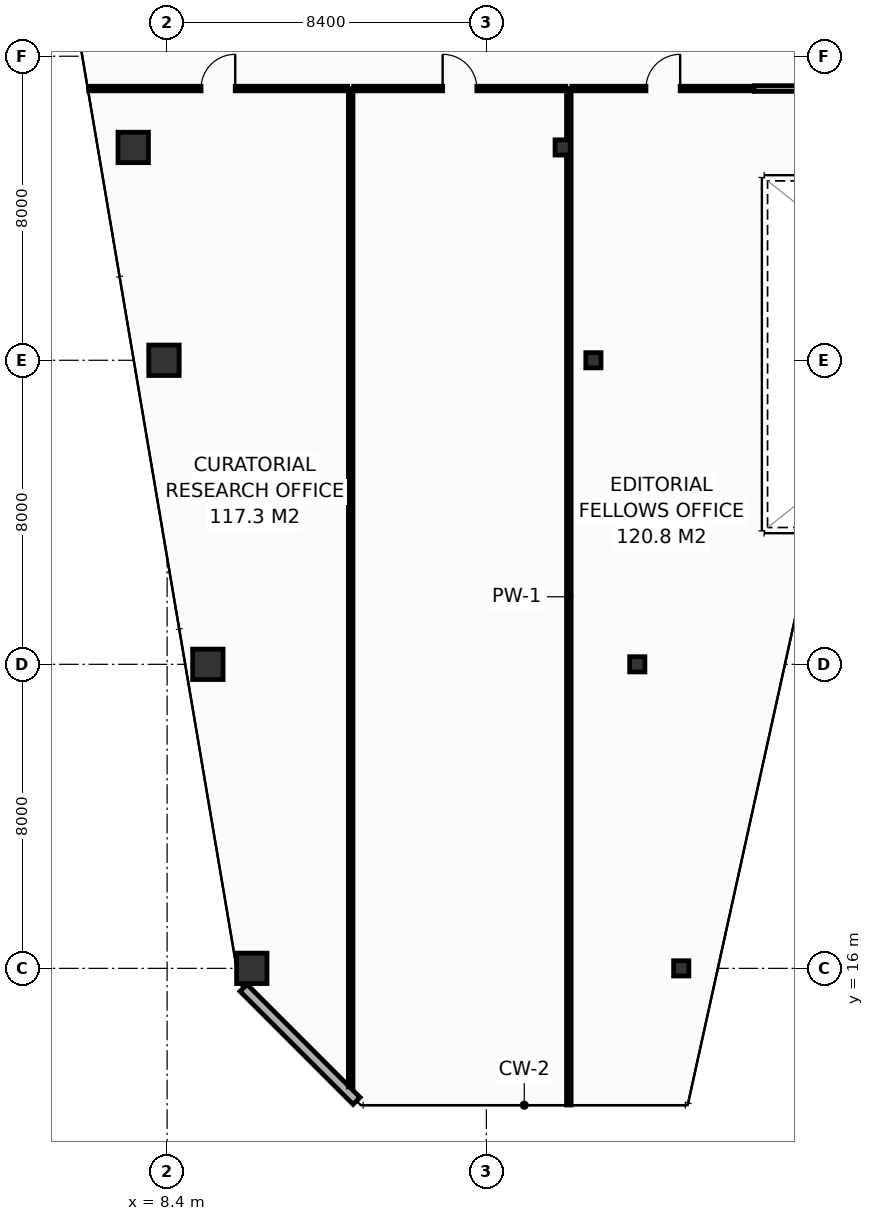
"""IFC4 building model, lengths in metres.
Left out: names, types, materials, properties, quantities, classifications, styles, units other than length and angle.
Written with IfcOpenShell. Run it as: python <this file> out.ifc"""

import sys

from ifc_helpers import new_model, si_unit, direction, frame, frame_2d, origin, origin_2d, place, context, subcontext, project, spatial, rectangle, hollow_rectangle, extrude, element, fill, save


model = new_model("IFC4")
c1 = context("Model", 3, precision=1e-05, world=origin(), true_north=direction((0.0, 1.0)))
c2 = subcontext(c1, "Body", "Model", "MODEL_VIEW")
j1 = project(units=[si_unit("LENGTHUNIT", "METRE"), si_unit("PLANEANGLEUNIT", "RADIAN")], contexts=[c1])
p1 = place(None, origin())
s1 = spatial("IfcSite", under=j1, at=p1, CompositionType="ELEMENT")
p2 = place(p1, origin())
s2 = spatial("IfcBuilding", under=s1, at=p2, CompositionType="ELEMENT")
p3 = place(p2, frame((0.0, 0.0, 186.6)))
s3 = spatial("IfcBuildingStorey", under=s2, at=p3, CompositionType="ELEMENT", Elevation=186.6)
p4 = place(p3, frame((10.628, 16.0, 0.0), z_axis=(0.0, 0.0, 1.0), x_axis=(1.0, 0.0, 0.0)))
e1 = element("IfcColumn", 1, at=p4, inside=s3, PredefinedType="COLUMN", context=c2, shape_type="SweptSolid", body=[
    extrude(hollow_rectangle(XDim=0.8, YDim=0.8, WallThickness=0.036, at=origin_2d()), origin(), (0.0, 0.0, 1.0), 3.8),
])
p5 = place(p3, frame((21.928, 16.0, 0.0), z_axis=(0.0, 0.0, 1.0), x_axis=(1.0, 0.0, 0.0)))
e2 = element("IfcColumn", 2, at=p5, inside=s3, PredefinedType="COLUMN", context=c2, shape_type="SweptSolid", body=[
    extrude(hollow_rectangle(XDim=0.4, YDim=0.4, WallThickness=0.016, at=origin_2d()), origin(), (0.0, 0.0, 1.0), 3.8),
])
p6 = place(p3, frame((9.472, 24.0, 0.0), z_axis=(0.0, 0.0, 1.0), x_axis=(1.0, 0.0, 0.0)))
e3 = element("IfcColumn", 3, at=p6, inside=s3, PredefinedType="COLUMN", context=c2, shape_type="SweptSolid", body=[
    extrude(hollow_rectangle(XDim=0.8, YDim=0.8, WallThickness=0.036, at=origin_2d()), origin(), (0.0, 0.0, 1.0), 3.8),
])
p7 = place(p3, frame((20.772, 24.0, 0.0), z_axis=(0.0, 0.0, 1.0), x_axis=(1.0, 0.0, 0.0)))
e4 = element("IfcColumn", 4, at=p7, inside=s3, PredefinedType="COLUMN", context=c2, shape_type="SweptSolid", body=[
    extrude(hollow_rectangle(XDim=0.4, YDim=0.4, WallThickness=0.016, at=origin_2d()), origin(), (0.0, 0.0, 1.0), 3.8),
])
p8 = place(p3, frame((8.317, 32.0, 0.0), z_axis=(0.0, 0.0, 1.0), x_axis=(1.0, 0.0, 0.0)))
e5 = element("IfcColumn", 5, at=p8, inside=s3, PredefinedType="COLUMN", context=c2, shape_type="SweptSolid", body=[
    extrude(hollow_rectangle(XDim=0.8, YDim=0.8, WallThickness=0.036, at=origin_2d()), origin(), (0.0, 0.0, 1.0), 3.8),
])
p9 = place(p3, frame((19.617, 32.0, 0.0), z_axis=(0.0, 0.0, 1.0), x_axis=(1.0, 0.0, 0.0)))
e6 = element("IfcColumn", 6, at=p9, inside=s3, PredefinedType="COLUMN", context=c2, shape_type="SweptSolid", body=[
    extrude(hollow_rectangle(XDim=0.4, YDim=0.4, WallThickness=0.016, at=origin_2d()), origin(), (0.0, 0.0, 1.0), 3.8),
])
p10 = place(p3, frame((7.508, 37.6, 0.0), z_axis=(0.0, 0.0, 1.0), x_axis=(1.0, 0.0, 0.0)))
e7 = element("IfcColumn", 7, at=p10, inside=s3, PredefinedType="COLUMN", context=c2, shape_type="SweptSolid", body=[
    extrude(hollow_rectangle(XDim=0.8, YDim=0.8, WallThickness=0.036, at=origin_2d()), origin(), (0.0, 0.0, 1.0), 3.8),
])
p11 = place(p3, frame((18.808, 37.6, 0.0), z_axis=(0.0, 0.0, 1.0), x_axis=(1.0, 0.0, 0.0)))
e8 = element("IfcColumn", 8, at=p11, inside=s3, PredefinedType="COLUMN", context=c2, shape_type="SweptSolid", body=[
    extrude(hollow_rectangle(XDim=0.4, YDim=0.4, WallThickness=0.016, at=origin_2d()), origin(), (0.0, 0.0, 1.0), 3.8),
])
p12 = place(p3, frame((10.411, 15.487, 0.0), z_axis=(0.0, 0.0, 1.0), x_axis=(0.707135806771, -0.70707775441, 0.0)))
e9 = element("IfcWall", 9, at=p12, inside=s3, PredefinedType="STANDARD", context=c2, shape_type="SweptSolid", body=[
    extrude(rectangle(XDim=4.206, YDim=0.26, at=frame_2d((2.103, 0.0))), origin(), (0.0, 0.0, 1.0), 3.55),
])
p13 = place(p3, frame((13.23, 12.88, 0.0), z_axis=(0.0, 0.0, 1.0), x_axis=(0.0, 1.0, 0.0)))
e10 = element("IfcWall", 10, at=p13, inside=s3, PredefinedType="PARTITIONING", context=c2, shape_type="SweptSolid", body=[
    extrude(rectangle(XDim=26.27, YDim=0.12, at=frame_2d((13.135, 0.0))), origin(), (0.0, 0.0, 1.0), 2.835),
])
p14 = place(p3, frame((18.97, 12.405, 0.0), z_axis=(0.0, 0.0, 1.0), x_axis=(0.0, 1.0, 0.0)))
e11 = element("IfcWall", 11, at=p14, inside=s3, PredefinedType="PARTITIONING", context=c2, shape_type="SweptSolid", body=[
    extrude(rectangle(XDim=26.745, YDim=0.12, at=frame_2d((13.373, 0.0))), origin(), (0.0, 0.0, 1.0), 2.835),
])
p15 = place(p3, frame((6.334, 39.15, 0.0), z_axis=(0.0, 0.0, 1.0), x_axis=(1.0, 0.0, 0.0)))
e12 = element("IfcWall", 12, at=p15, inside=s3, PredefinedType="PARTITIONING", context=c2, shape_type="SweptSolid", body=[
    extrude(rectangle(XDim=6.816, YDim=0.12, at=frame_2d((3.408, 0.0))), origin(), (0.0, 0.0, 1.0), 3.035),
])
p16 = place(p15, frame((2.958, 0.0, 0.0)))
e13 = element("IfcOpeningElement", 13, at=p16, cuts=e12, PredefinedType="OPENING", context=c2, shape_type="SweptSolid", body=[
    extrude(rectangle(XDim=0.9, YDim=2.1, at=frame_2d((0.45, 1.05))), frame((0.0, 0.07, 0.0), z_axis=(0.0, -1.0, 0.0), x_axis=(1.0, 0.0, 0.0)), (0.0, 0.0, 1.0), 0.14),
])
p17 = place(p3, frame((13.31, 39.15, 0.0), z_axis=(0.0, 0.0, 1.0), x_axis=(1.0, 0.0, 0.0)))
e14 = element("IfcWall", 14, at=p17, inside=s3, PredefinedType="PARTITIONING", context=c2, shape_type="SweptSolid", body=[
    extrude(rectangle(XDim=5.58, YDim=0.12, at=frame_2d((2.79, 0.0))), origin(), (0.0, 0.0, 1.0), 3.55),
])
p18 = place(p17, frame((2.34, 0.0, 0.0)))
e15 = element("IfcOpeningElement", 15, at=p18, cuts=e14, PredefinedType="OPENING", context=c2, shape_type="SweptSolid", body=[
    extrude(rectangle(XDim=0.9, YDim=2.1, at=frame_2d((0.45, 1.05))), frame((0.0, 0.07, 0.0), z_axis=(0.0, -1.0, 0.0), x_axis=(1.0, 0.0, 0.0)), (0.0, 0.0, 1.0), 0.14),
])
p19 = place(p3, frame((19.05, 39.15, 0.0), z_axis=(0.0, 0.0, 1.0), x_axis=(1.0, 0.0, 0.0)))
e16 = element("IfcWall", 16, at=p19, inside=s3, PredefinedType="PARTITIONING", context=c2, shape_type="SweptSolid", body=[
    extrude(rectangle(XDim=4.8, YDim=0.12, at=frame_2d((2.4, 0.0))), origin(), (0.0, 0.0, 1.0), 2.835),
])
p20 = place(p19, frame((1.95, 0.0, 0.0)))
e17 = element("IfcOpeningElement", 17, at=p20, cuts=e16, PredefinedType="OPENING", context=c2, shape_type="SweptSolid", body=[
    extrude(rectangle(XDim=0.9, YDim=2.1, at=frame_2d((0.45, 1.05))), frame((0.0, 0.07, 0.0), z_axis=(0.0, -1.0, 0.0), x_axis=(1.0, 0.0, 0.0)), (0.0, 0.0, 1.0), 0.14),
])
p21 = place(p3, frame((23.85, 39.15, 0.0), z_axis=(0.0, 0.0, 1.0), x_axis=(1.0, 0.0, 0.0)))
e18 = element("IfcWall", 18, at=p21, inside=s3, PredefinedType="PARTITIONING", context=c2, shape_type="SweptSolid", body=[
    extrude(rectangle(XDim=12.3, YDim=0.15, at=frame_2d((6.15, 0.0))), origin(), (0.0, 0.0, 1.0), 3.55),
])
p22 = place(p16, origin())
e19 = element("IfcDoor", 19, at=p22, inside=s3, OperationType="SINGLE_SWING_RIGHT", PredefinedType="DOOR", context=c2, shape_type="SweptSolid", body=[
    extrude(rectangle(XDim=0.9, YDim=2.1, at=frame_2d((0.45, 1.05))), frame((0.0, 0.025, 0.0), z_axis=(0.0, -1.0, 0.0), x_axis=(1.0, 0.0, 0.0)), (0.0, 0.0, 1.0), 0.05),
])
fill(e13, e19)
p23 = place(p18, origin())
e20 = element("IfcDoor", 20, at=p23, inside=s3, OperationType="SINGLE_SWING_LEFT", PredefinedType="DOOR", context=c2, shape_type="SweptSolid", body=[
    extrude(rectangle(XDim=0.9, YDim=2.1, at=frame_2d((0.45, 1.05))), frame((0.0, 0.025, 0.0), z_axis=(0.0, -1.0, 0.0), x_axis=(1.0, 0.0, 0.0)), (0.0, 0.0, 1.0), 0.05),
])
fill(e15, e20)
p24 = place(p20, origin())
e21 = element("IfcDoor", 21, at=p24, inside=s3, OperationType="SINGLE_SWING_RIGHT", PredefinedType="DOOR", context=c2, shape_type="SweptSolid", body=[
    extrude(rectangle(XDim=0.9, YDim=2.1, at=frame_2d((0.45, 1.05))), frame((0.0, 0.025, 0.0), z_axis=(0.0, -1.0, 0.0), x_axis=(1.0, 0.0, 0.0)), (0.0, 0.0, 1.0), 0.05),
])
fill(e17, e21)
save(model, sys.argv[1])
